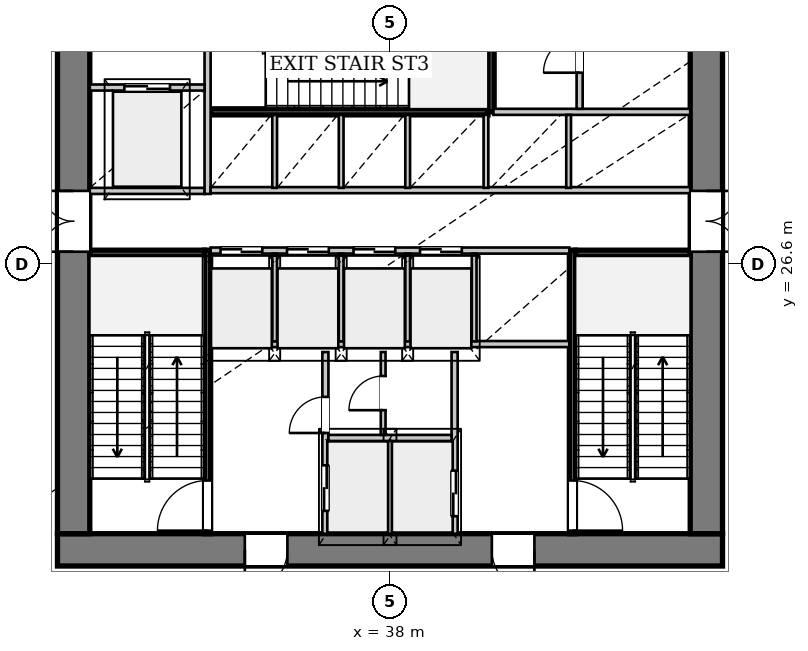
"""IFC4 building model, lengths in metres.
Left out: names, types, materials, properties, quantities, classifications, styles, units other than length and angle.
Written with IfcOpenShell. Run it as: python <this file> out.ifc"""

import sys

from ifc_helpers import new_model, si_unit, direction, frame, frame_2d, origin, place, context, subcontext, project, spatial, rectangle, extrude, source, transform, mapped, element, fill, save


model = new_model("IFC4")
c1 = context("Model", 3, precision=1e-05, world=origin(), true_north=direction((0.0, 1.0)))
c2 = subcontext(c1, "Body", "Model", "MODEL_VIEW")
j1 = project(units=[si_unit("LENGTHUNIT", "METRE"), si_unit("PLANEANGLEUNIT", "RADIAN")], contexts=[c1])
p1 = place(None, origin())
s1 = spatial("IfcSite", under=j1, at=p1, CompositionType="ELEMENT")
p2 = place(p1, origin())
s2 = spatial("IfcBuilding", under=s1, at=p2, CompositionType="ELEMENT")
p3 = place(p2, frame((0.0, 0.0, 5.4)))
s3 = spatial("IfcBuildingStorey", under=s2, at=p3, CompositionType="ELEMENT", Elevation=5.4)
p4 = place(p3, frame((46.75, 19.075, 0.0), z_axis=(0.0, 0.0, 1.0), x_axis=(-1.0, 0.0, 0.0)))
e1 = element("IfcWall", 1, at=p4, inside=s3, PredefinedType="SHEAR", context=c2, shape_type="SweptSolid", body=[
    extrude(rectangle(XDim=17.5, YDim=0.85, at=frame_2d((8.75, 0.0))), origin(), (0.0, 0.0, 1.0), 4.48),
])
p5 = place(p4, frame((4.95, 0.0, 0.0)))
e2 = element("IfcOpeningElement", 2, at=p5, cuts=e1, PredefinedType="OPENING", context=c2, shape_type="SweptSolid", body=[
    extrude(rectangle(XDim=1.12, YDim=2.25, at=frame_2d((0.56, 1.125))), frame((0.0, 0.435, 0.0), z_axis=(0.0, -1.0, 0.0), x_axis=(1.0, 0.0, 0.0)), (0.0, 0.0, 1.0), 0.87),
])
p6 = place(p4, frame((11.45, 0.0, 0.0)))
e3 = element("IfcOpeningElement", 3, at=p6, cuts=e1, PredefinedType="OPENING", context=c2, shape_type="SweptSolid", body=[
    extrude(rectangle(XDim=1.12, YDim=2.25, at=frame_2d((0.56, 1.125))), frame((0.0, 0.435, 0.0), z_axis=(0.0, -1.0, 0.0), x_axis=(1.0, 0.0, 0.0)), (0.0, 0.0, 1.0), 0.87),
])
p7 = place(p3, frame((29.675, 19.5, 0.0), z_axis=(0.0, 0.0, 1.0), x_axis=(0.0, 1.0, 0.0)))
e4 = element("IfcWall", 4, at=p7, inside=s3, PredefinedType="SHEAR", context=c2, shape_type="SweptSolid", body=[
    extrude(rectangle(XDim=14.2, YDim=0.85, at=frame_2d((7.1, 0.0))), origin(), (0.0, 0.0, 1.0), 4.48),
])
p8 = place(p7, frame((7.42, 0.0, 0.0)))
e5 = element("IfcOpeningElement", 5, at=p8, cuts=e4, PredefinedType="OPENING", context=c2, shape_type="SweptSolid", body=[
    extrude(rectangle(XDim=1.6, YDim=2.2, at=frame_2d((0.8, 1.1))), frame((0.0, 0.435, 0.0), z_axis=(0.0, -1.0, 0.0), x_axis=(1.0, 0.0, 0.0)), (0.0, 0.0, 1.0), 0.87),
])
p9 = place(p3, frame((46.325, 33.7, 0.0), z_axis=(0.0, 0.0, 1.0), x_axis=(0.0, -1.0, 0.0)))
e6 = element("IfcWall", 6, at=p9, inside=s3, PredefinedType="SHEAR", context=c2, shape_type="SweptSolid", body=[
    extrude(rectangle(XDim=14.2, YDim=0.85, at=frame_2d((7.1, 0.0))), origin(), (0.0, 0.0, 1.0), 4.48),
])
p10 = place(p9, frame((5.18, 0.0, 0.0)))
e7 = element("IfcOpeningElement", 7, at=p10, cuts=e6, PredefinedType="OPENING", context=c2, shape_type="SweptSolid", body=[
    extrude(rectangle(XDim=1.6, YDim=2.2, at=frame_2d((0.8, 1.1))), frame((0.0, 0.435, 0.0), z_axis=(0.0, -1.0, 0.0), x_axis=(1.0, 0.0, 0.0)), (0.0, 0.0, 1.0), 0.87),
])
p11 = place(p3, frame((33.2, 19.5, 0.0), z_axis=(0.0, 0.0, 1.0), x_axis=(0.0, 1.0, 0.0)))
e8 = element("IfcWall", 8, at=p11, inside=s3, PredefinedType="PARTITIONING", context=c2, shape_type="SweptSolid", body=[
    extrude(rectangle(XDim=7.46, YDim=0.16, at=frame_2d((3.73, 0.0))), origin(), (0.0, 0.0, 1.0), 4.48),
])
p12 = place(p11, frame((0.08, 0.0, 0.0)))
e9 = element("IfcOpeningElement", 9, at=p12, cuts=e8, PredefinedType="OPENING", context=c2, shape_type="SweptSolid", body=[
    extrude(rectangle(XDim=1.32, YDim=2.2, at=frame_2d((0.66, 1.1))), frame((0.0, 0.09, 0.0), z_axis=(0.0, -1.0, 0.0), x_axis=(1.0, 0.0, 0.0)), (0.0, 0.0, 1.0), 0.18),
])
p13 = place(p3, frame((30.1, 26.88, 0.0), z_axis=(0.0, 0.0, 1.0), x_axis=(1.0, 0.0, 0.0)))
e10 = element("IfcWall", 10, at=p13, inside=s3, PredefinedType="PARTITIONING", context=c2, shape_type="SweptSolid", body=[
    extrude(rectangle(XDim=3.02, YDim=0.16, at=frame_2d((1.51, 0.0))), origin(), (0.0, 0.0, 1.0), 4.48),
])
p14 = place(p3, frame((42.8, 26.96, 0.0), z_axis=(0.0, 0.0, 1.0), x_axis=(0.0, -1.0, 0.0)))
e11 = element("IfcWall", 11, at=p14, inside=s3, PredefinedType="PARTITIONING", context=c2, shape_type="SweptSolid", body=[
    extrude(rectangle(XDim=7.46, YDim=0.16, at=frame_2d((3.73, 0.0))), origin(), (0.0, 0.0, 1.0), 4.48),
])
p15 = place(p14, frame((6.06, 0.0, 0.0)))
e12 = element("IfcOpeningElement", 12, at=p15, cuts=e11, PredefinedType="OPENING", context=c2, shape_type="SweptSolid", body=[
    extrude(rectangle(XDim=1.32, YDim=2.2, at=frame_2d((0.66, 1.1))), frame((0.0, 0.09, 0.0), z_axis=(0.0, -1.0, 0.0), x_axis=(1.0, 0.0, 0.0)), (0.0, 0.0, 1.0), 0.18),
])
p16 = place(p3, frame((42.88, 26.88, 0.0), z_axis=(0.0, 0.0, 1.0), x_axis=(1.0, 0.0, 0.0)))
e13 = element("IfcWall", 13, at=p16, inside=s3, PredefinedType="PARTITIONING", context=c2, shape_type="SweptSolid", body=[
    extrude(rectangle(XDim=3.02, YDim=0.16, at=frame_2d((1.51, 0.0))), origin(), (0.0, 0.0, 1.0), 4.48),
])
p17 = place(p3, frame((33.28, 30.6, 0.0), z_axis=(0.0, 0.0, 1.0), x_axis=(1.0, 0.0, 0.0)))
e14 = element("IfcWall", 14, at=p17, inside=s3, PredefinedType="PARTITIONING", context=c2, shape_type="SweptSolid", body=[
    extrude(rectangle(XDim=7.3, YDim=0.16, at=frame_2d((3.65, 0.0))), origin(), (0.0, 0.0, 1.0), 4.48),
])
p18 = place(p3, frame((40.66, 30.6, 0.0), z_axis=(0.0, 0.0, 1.0), x_axis=(0.0, 1.0, 0.0)))
e15 = element("IfcWall", 15, at=p18, inside=s3, PredefinedType="PARTITIONING", context=c2, shape_type="SweptSolid", body=[
    extrude(rectangle(XDim=3.1, YDim=0.16, at=frame_2d((1.55, 0.0))), origin(), (0.0, 0.0, 1.0), 4.48),
])
p19 = place(p3, frame((36.3, 19.5, 0.0), z_axis=(0.0, 0.0, 1.0), x_axis=(0.0, 1.0, 0.0)))
e16 = element("IfcWall", 16, at=p19, inside=s3, PredefinedType="PARTITIONING", context=c2, shape_type="SweptSolid", body=[
    extrude(rectangle(XDim=4.78, YDim=0.16, at=frame_2d((2.39, 0.0))), origin(), (0.0, 0.0, 1.0), 4.48),
])
p20 = place(p19, frame((0.6, 0.0, 0.0)))
e17 = element("IfcOpeningElement", 17, at=p20, cuts=e16, PredefinedType="OPENING", context=c2, shape_type="SweptSolid", body=[
    extrude(rectangle(XDim=1.2, YDim=2.2, at=frame_2d((0.6, 1.1))), frame((0.0, 0.09, 0.0), z_axis=(0.0, -1.0, 0.0), x_axis=(1.0, 0.0, 0.0)), (0.0, 0.0, 1.0), 0.18),
])
p21 = place(p19, frame((2.65, 0.0, 0.0)))
e18 = element("IfcOpeningElement", 18, at=p21, cuts=e16, PredefinedType="OPENING", context=c2, shape_type="SweptSolid", body=[
    extrude(rectangle(XDim=0.95, YDim=2.1, at=frame_2d((0.475, 1.05))), frame((0.0, 0.09, 0.0), z_axis=(0.0, -1.0, 0.0), x_axis=(1.0, 0.0, 0.0)), (0.0, 0.0, 1.0), 0.18),
])
p22 = place(p3, frame((39.7, 24.28, 0.0), z_axis=(0.0, 0.0, 1.0), x_axis=(0.0, -1.0, 0.0)))
e19 = element("IfcWall", 19, at=p22, inside=s3, PredefinedType="PARTITIONING", context=c2, shape_type="SweptSolid", body=[
    extrude(rectangle(XDim=4.78, YDim=0.16, at=frame_2d((2.39, 0.0))), origin(), (0.0, 0.0, 1.0), 4.48),
])
p23 = place(p22, frame((3.12, 0.0, 0.0)))
e20 = element("IfcOpeningElement", 20, at=p23, cuts=e19, PredefinedType="OPENING", context=c2, shape_type="SweptSolid", body=[
    extrude(rectangle(XDim=1.2, YDim=2.2, at=frame_2d((0.6, 1.1))), frame((0.0, 0.09, 0.0), z_axis=(0.0, -1.0, 0.0), x_axis=(1.0, 0.0, 0.0)), (0.0, 0.0, 1.0), 0.18),
])
p24 = place(p3, frame((38.0, 19.5, 0.0), z_axis=(0.0, 0.0, 1.0), x_axis=(0.0, 1.0, 0.0)))
e21 = element("IfcWall", 21, at=p24, inside=s3, PredefinedType="PARTITIONING", context=c2, shape_type="SweptSolid", body=[
    extrude(rectangle(XDim=2.46, YDim=0.125, at=frame_2d((1.23, 0.0))), origin(), (0.0, 0.0, 1.0), 4.48),
])
p25 = place(p3, frame((36.38, 22.02, 0.0), z_axis=(0.0, 0.0, 1.0), x_axis=(1.0, 0.0, 0.0)))
e22 = element("IfcWall", 22, at=p25, inside=s3, PredefinedType="PARTITIONING", context=c2, shape_type="SweptSolid", body=[
    extrude(rectangle(XDim=3.24, YDim=0.16, at=frame_2d((1.62, 0.0))), origin(), (0.0, 0.0, 1.0), 4.48),
])
p26 = place(p3, frame((33.28, 24.49, 0.0), z_axis=(0.0, 0.0, 1.0), x_axis=(1.0, 0.0, 0.0)))
e23 = element("IfcWall", 23, at=p26, inside=s3, PredefinedType="PARTITIONING", context=c2, shape_type="SweptSolid", body=[
    extrude(rectangle(XDim=9.44, YDim=0.16, at=frame_2d((4.72, 0.0))), origin(), (0.0, 0.0, 1.0), 4.48),
])
p27 = place(p3, frame((37.82, 22.1, 0.0), z_axis=(0.0, 0.0, 1.0), x_axis=(0.0, 1.0, 0.0)))
e24 = element("IfcWall", 24, at=p27, inside=s3, PredefinedType="PARTITIONING", context=c2, shape_type="SweptSolid", body=[
    extrude(rectangle(XDim=2.18, YDim=0.125, at=frame_2d((1.09, 0.0))), origin(), (0.0, 0.0, 1.0), 4.48),
])
p28 = place(p27, frame((0.65, 0.0, 0.0)))
e25 = element("IfcOpeningElement", 25, at=p28, cuts=e24, PredefinedType="OPENING", context=c2, shape_type="SweptSolid", body=[
    extrude(rectangle(XDim=0.9, YDim=2.1, at=frame_2d((0.45, 1.05))), frame((0.0, 0.073, 0.0), z_axis=(0.0, -1.0, 0.0), x_axis=(1.0, 0.0, 0.0)), (0.0, 0.0, 1.0), 0.145),
])
p29 = place(p3, frame((30.1, 28.52, 0.0), z_axis=(0.0, 0.0, 1.0), x_axis=(1.0, 0.0, 0.0)))
e26 = element("IfcWall", 26, at=p29, inside=s3, PredefinedType="PARTITIONING", context=c2, shape_type="SweptSolid", body=[
    extrude(rectangle(XDim=3.02, YDim=0.16, at=frame_2d((1.51, 0.0))), origin(), (0.0, 0.0, 1.0), 4.48),
])
p30 = place(p3, frame((33.2, 28.44, 0.0), z_axis=(0.0, 0.0, 1.0), x_axis=(0.0, 1.0, 0.0)))
e27 = element("IfcWall", 27, at=p30, inside=s3, PredefinedType="PARTITIONING", context=c2, shape_type="SweptSolid", body=[
    extrude(rectangle(XDim=5.26, YDim=0.16, at=frame_2d((2.63, 0.0))), origin(), (0.0, 0.0, 1.0), 4.48),
])
p31 = place(p3, frame((30.1, 31.24, 0.0), z_axis=(0.0, 0.0, 1.0), x_axis=(1.0, 0.0, 0.0)))
e28 = element("IfcWall", 28, at=p31, inside=s3, PredefinedType="PARTITIONING", context=c2, shape_type="SweptSolid", body=[
    extrude(rectangle(XDim=3.02, YDim=0.16, at=frame_2d((1.51, 0.0))), origin(), (0.0, 0.0, 1.0), 4.48),
])
p32 = place(p31, frame((0.91, 0.0, 0.0)))
e29 = element("IfcOpeningElement", 29, at=p32, cuts=e28, PredefinedType="OPENING", context=c2, shape_type="SweptSolid", body=[
    extrude(rectangle(XDim=1.2, YDim=2.2, at=frame_2d((0.6, 1.1))), frame((0.0, 0.09, 0.0), z_axis=(0.0, -1.0, 0.0), x_axis=(1.0, 0.0, 0.0)), (0.0, 0.0, 1.0), 0.18),
])
p33 = place(p3, frame((33.28, 26.95, 0.0), z_axis=(0.0, 0.0, 1.0), x_axis=(1.0, 0.0, 0.0)))
e30 = element("IfcWall", 30, at=p33, inside=s3, PredefinedType="PARTITIONING", context=c2, shape_type="SweptSolid", body=[
    extrude(rectangle(XDim=9.44, YDim=0.16, at=frame_2d((4.72, 0.0))), origin(), (0.0, 0.0, 1.0), 4.48),
])
p34 = place(p33, frame((0.26, 0.0, 0.0)))
e31 = element("IfcOpeningElement", 31, at=p34, cuts=e30, PredefinedType="OPENING", context=c2, shape_type="SweptSolid", body=[
    extrude(rectangle(XDim=1.1, YDim=2.2, at=frame_2d((0.55, 1.1))), frame((0.0, 0.09, 0.0), z_axis=(0.0, -1.0, 0.0), x_axis=(1.0, 0.0, 0.0)), (0.0, 0.0, 1.0), 0.18),
])
p35 = place(p33, frame((2.01, 0.0, 0.0)))
e32 = element("IfcOpeningElement", 32, at=p35, cuts=e30, PredefinedType="OPENING", context=c2, shape_type="SweptSolid", body=[
    extrude(rectangle(XDim=1.1, YDim=2.2, at=frame_2d((0.55, 1.1))), frame((0.0, 0.09, 0.0), z_axis=(0.0, -1.0, 0.0), x_axis=(1.0, 0.0, 0.0)), (0.0, 0.0, 1.0), 0.18),
])
p36 = place(p33, frame((3.76, 0.0, 0.0)))
e33 = element("IfcOpeningElement", 33, at=p36, cuts=e30, PredefinedType="OPENING", context=c2, shape_type="SweptSolid", body=[
    extrude(rectangle(XDim=1.1, YDim=2.2, at=frame_2d((0.55, 1.1))), frame((0.0, 0.09, 0.0), z_axis=(0.0, -1.0, 0.0), x_axis=(1.0, 0.0, 0.0)), (0.0, 0.0, 1.0), 0.18),
])
p37 = place(p33, frame((5.51, 0.0, 0.0)))
e34 = element("IfcOpeningElement", 34, at=p37, cuts=e30, PredefinedType="OPENING", context=c2, shape_type="SweptSolid", body=[
    extrude(rectangle(XDim=1.1, YDim=2.2, at=frame_2d((0.55, 1.1))), frame((0.0, 0.09, 0.0), z_axis=(0.0, -1.0, 0.0), x_axis=(1.0, 0.0, 0.0)), (0.0, 0.0, 1.0), 0.18),
])
for number, where, z_axis, x_axis in (
    (35, (34.965, 24.56, 0.0), (0.0, 0.0, 1.0), (0.0, 1.0, 0.0)),
    (36, (36.715, 24.56, 0.0), (0.0, 0.0, 1.0), (0.0, 1.0, 0.0)),
    (37, (38.465, 24.56, 0.0), (0.0, 0.0, 1.0), (0.0, 1.0, 0.0)),
    (38, (40.215, 24.56, 0.0), (0.0, 0.0, 1.0), (0.0, 1.0, 0.0)),
):
    element("IfcWall", number, at=place(p3, frame(where, z_axis=z_axis, x_axis=x_axis)), inside=s3, PredefinedType="PARTITIONING", context=c2, shape_type="SweptSolid", body=[
        extrude(rectangle(XDim=2.31, YDim=0.125, at=frame_2d((1.155, 0.0))), origin(), (0.0, 0.0, 1.0), 4.48),
    ])
p38 = place(p3, frame((33.28, 28.54, 0.0), z_axis=(0.0, 0.0, 1.0), x_axis=(1.0, 0.0, 0.0)))
e39 = element("IfcWall", 39, at=p38, inside=s3, PredefinedType="PARTITIONING", context=c2, shape_type="SweptSolid", body=[
    extrude(rectangle(XDim=12.62, YDim=0.16, at=frame_2d((6.31, 0.0))), origin(), (0.0, 0.0, 1.0), 4.48),
])
p39 = place(p3, frame((40.72, 30.6, 0.0), z_axis=(0.0, 0.0, 1.0), x_axis=(1.0, 0.0, 0.0)))
e40 = element("IfcWall", 40, at=p39, inside=s3, PredefinedType="PARTITIONING", context=c2, shape_type="SweptSolid", body=[
    extrude(rectangle(XDim=5.18, YDim=0.16, at=frame_2d((2.59, 0.0))), origin(), (0.0, 0.0, 1.0), 4.48),
])
for number, where, z_axis, x_axis in (
    (41, (34.965, 28.6, 0.0), (0.0, 0.0, 1.0), (0.0, 1.0, 0.0)),
    (42, (36.715, 28.6, 0.0), (0.0, 0.0, 1.0), (0.0, 1.0, 0.0)),
    (43, (38.465, 28.6, 0.0), (0.0, 0.0, 1.0), (0.0, 1.0, 0.0)),
    (44, (40.525, 28.6, 0.0), (0.0, 0.0, 1.0), (0.0, 1.0, 0.0)),
    (45, (42.7, 28.6, 0.0), (0.0, 0.0, 1.0), (0.0, 1.0, 0.0)),
):
    element("IfcWall", number, at=place(p3, frame(where, z_axis=z_axis, x_axis=x_axis)), inside=s3, PredefinedType="PARTITIONING", context=c2, shape_type="SweptSolid", body=[
        extrude(rectangle(XDim=1.92, YDim=0.125, at=frame_2d((0.96, 0.0))), origin(), (0.0, 0.0, 1.0), 4.48),
    ])
p40 = place(p3, frame((42.99, 30.68, 0.0), z_axis=(0.0, 0.0, 1.0), x_axis=(0.0, 1.0, 0.0)))
e46 = element("IfcWall", 46, at=p40, inside=s3, PredefinedType="PARTITIONING", context=c2, shape_type="SweptSolid", body=[
    extrude(rectangle(XDim=3.02, YDim=0.16, at=frame_2d((1.51, 0.0))), origin(), (0.0, 0.0, 1.0), 4.48),
])
p41 = place(p40, frame((0.95, 0.0, 0.0)))
e47 = element("IfcOpeningElement", 47, at=p41, cuts=e46, PredefinedType="OPENING", context=c2, shape_type="SweptSolid", body=[
    extrude(rectangle(XDim=0.95, YDim=2.1, at=frame_2d((0.475, 1.05))), frame((0.0, 0.09, 0.0), z_axis=(0.0, -1.0, 0.0), x_axis=(1.0, 0.0, 0.0)), (0.0, 0.0, 1.0), 0.18),
])
m1 = source(origin(), c2, "Body", "SweptSolid", [
    extrude(rectangle(XDim=1.12, YDim=2.25, at=frame_2d((0.56, 1.125))), frame((0.0, 0.025, 0.0), z_axis=(0.0, -1.0, 0.0), x_axis=(1.0, 0.0, 0.0)), (0.0, 0.0, 1.0), 0.05),
])
p42 = place(p5, origin())
e48 = element("IfcDoor", 48, at=p42, inside=s3, OperationType="SINGLE_SWING_LEFT", PredefinedType="DOOR", context=c2, shape_type="MappedRepresentation", body=[
    mapped(m1, transform((0.0, 0.0, 0.0), x_axis=(1.0, 0.0, 0.0), y_axis=(0.0, 1.0, 0.0), z_axis=(0.0, 0.0, 1.0), scale=1.0)),
])
fill(e2, e48)
p43 = place(p6, origin())
e49 = element("IfcDoor", 49, at=p43, inside=s3, OperationType="SINGLE_SWING_RIGHT", PredefinedType="DOOR", context=c2, shape_type="MappedRepresentation", body=[
    mapped(m1, transform((0.0, 0.0, 0.0), x_axis=(1.0, 0.0, 0.0), y_axis=(0.0, 1.0, 0.0), z_axis=(0.0, 0.0, 1.0), scale=1.0)),
])
fill(e3, e49)
m2 = source(origin(), c2, "Body", "SweptSolid", [
    extrude(rectangle(XDim=1.6, YDim=2.2, at=frame_2d((0.8, 1.1))), frame((0.0, 0.025, 0.0), z_axis=(0.0, -1.0, 0.0), x_axis=(1.0, 0.0, 0.0)), (0.0, 0.0, 1.0), 0.05),
])
p44 = place(p8, origin())
e50 = element("IfcDoor", 50, at=p44, inside=s3, OperationType="DOUBLE_DOOR_SINGLE_SWING", PredefinedType="DOOR", context=c2, shape_type="MappedRepresentation", body=[
    mapped(m2, transform((0.0, 0.0, 0.0), x_axis=(1.0, 0.0, 0.0), y_axis=(0.0, 1.0, 0.0), z_axis=(0.0, 0.0, 1.0), scale=1.0)),
])
fill(e5, e50)
p45 = place(p10, origin())
e51 = element("IfcDoor", 51, at=p45, inside=s3, OperationType="DOUBLE_DOOR_SINGLE_SWING", PredefinedType="DOOR", context=c2, shape_type="MappedRepresentation", body=[
    mapped(m2, transform((0.0, 0.0, 0.0), x_axis=(1.0, 0.0, 0.0), y_axis=(0.0, 1.0, 0.0), z_axis=(0.0, 0.0, 1.0), scale=1.0)),
])
fill(e7, e51)
m3 = source(origin(), c2, "Body", "SweptSolid", [
    extrude(rectangle(XDim=1.32, YDim=2.2, at=frame_2d((0.66, 1.1))), frame((0.0, 0.025, 0.0), z_axis=(0.0, -1.0, 0.0), x_axis=(1.0, 0.0, 0.0)), (0.0, 0.0, 1.0), 0.05),
])
p46 = place(p12, origin())
e52 = element("IfcDoor", 52, at=p46, inside=s3, OperationType="SINGLE_SWING_LEFT", PredefinedType="DOOR", context=c2, shape_type="MappedRepresentation", body=[
    mapped(m3, transform((0.0, 0.0, 0.0), x_axis=(1.0, 0.0, 0.0), y_axis=(0.0, 1.0, 0.0), z_axis=(0.0, 0.0, 1.0), scale=1.0)),
])
fill(e9, e52)
p47 = place(p15, origin())
e53 = element("IfcDoor", 53, at=p47, inside=s3, OperationType="SINGLE_SWING_RIGHT", PredefinedType="DOOR", context=c2, shape_type="MappedRepresentation", body=[
    mapped(m3, transform((0.0, 0.0, 0.0), x_axis=(1.0, 0.0, 0.0), y_axis=(0.0, 1.0, 0.0), z_axis=(0.0, 0.0, 1.0), scale=1.0)),
])
fill(e12, e53)
m4 = source(origin(), c2, "Body", "SweptSolid", [
    extrude(rectangle(XDim=1.2, YDim=2.2, at=frame_2d((0.6, 1.1))), frame((0.0, 0.025, 0.0), z_axis=(0.0, -1.0, 0.0), x_axis=(1.0, 0.0, 0.0)), (0.0, 0.0, 1.0), 0.05),
])
p48 = place(p20, origin())
e54 = element("IfcDoor", 54, at=p48, inside=s3, OperationType="DOUBLE_DOOR_SLIDING", PredefinedType="DOOR", context=c2, shape_type="MappedRepresentation", body=[
    mapped(m4, transform((0.0, 0.0, 0.0), x_axis=(1.0, 0.0, 0.0), y_axis=(0.0, 1.0, 0.0), z_axis=(0.0, 0.0, 1.0), scale=1.0)),
])
fill(e17, e54)
m5 = source(origin(), c2, "Body", "SweptSolid", [
    extrude(rectangle(XDim=0.95, YDim=2.1, at=frame_2d((0.475, 1.05))), frame((0.0, 0.025, 0.0), z_axis=(0.0, -1.0, 0.0), x_axis=(1.0, 0.0, 0.0)), (0.0, 0.0, 1.0), 0.05),
])
p49 = place(p21, origin())
e55 = element("IfcDoor", 55, at=p49, inside=s3, OperationType="SINGLE_SWING_LEFT", PredefinedType="DOOR", context=c2, shape_type="MappedRepresentation", body=[
    mapped(m5, transform((0.0, 0.0, 0.0), x_axis=(1.0, 0.0, 0.0), y_axis=(0.0, 1.0, 0.0), z_axis=(0.0, 0.0, 1.0), scale=1.0)),
])
fill(e18, e55)
m6 = source(origin(), c2, "Body", "SweptSolid", [
    extrude(rectangle(XDim=0.9, YDim=2.1, at=frame_2d((0.45, 1.05))), frame((0.0, 0.025, 0.0), z_axis=(0.0, -1.0, 0.0), x_axis=(1.0, 0.0, 0.0)), (0.0, 0.0, 1.0), 0.05),
])
p50 = place(p28, origin())
e56 = element("IfcDoor", 56, at=p50, inside=s3, OperationType="SINGLE_SWING_LEFT", PredefinedType="DOOR", context=c2, shape_type="MappedRepresentation", body=[
    mapped(m6, transform((0.0, 0.0, 0.0), x_axis=(1.0, 0.0, 0.0), y_axis=(0.0, 1.0, 0.0), z_axis=(0.0, 0.0, 1.0), scale=1.0)),
])
fill(e25, e56)
p51 = place(p23, origin())
e57 = element("IfcDoor", 57, at=p51, inside=s3, OperationType="DOUBLE_DOOR_SLIDING", PredefinedType="DOOR", context=c2, shape_type="MappedRepresentation", body=[
    mapped(m4, transform((0.0, 0.0, 0.0), x_axis=(1.0, 0.0, 0.0), y_axis=(0.0, 1.0, 0.0), z_axis=(0.0, 0.0, 1.0), scale=1.0)),
])
fill(e20, e57)
p52 = place(p32, origin())
e58 = element("IfcDoor", 58, at=p52, inside=s3, OperationType="DOUBLE_DOOR_SLIDING", PredefinedType="DOOR", context=c2, shape_type="MappedRepresentation", body=[
    mapped(m4, transform((0.0, 0.0, 0.0), x_axis=(1.0, 0.0, 0.0), y_axis=(0.0, 1.0, 0.0), z_axis=(0.0, 0.0, 1.0), scale=1.0)),
])
fill(e29, e58)
m7 = source(origin(), c2, "Body", "SweptSolid", [
    extrude(rectangle(XDim=1.1, YDim=2.2, at=frame_2d((0.55, 1.1))), frame((0.0, 0.025, 0.0), z_axis=(0.0, -1.0, 0.0), x_axis=(1.0, 0.0, 0.0)), (0.0, 0.0, 1.0), 0.05),
])
p53 = place(p34, origin())
e59 = element("IfcDoor", 59, at=p53, inside=s3, OperationType="DOUBLE_DOOR_SLIDING", PredefinedType="DOOR", context=c2, shape_type="MappedRepresentation", body=[
    mapped(m7, transform((0.0, 0.0, 0.0), x_axis=(1.0, 0.0, 0.0), y_axis=(0.0, 1.0, 0.0), z_axis=(0.0, 0.0, 1.0), scale=1.0)),
])
fill(e31, e59)
p54 = place(p35, origin())
e60 = element("IfcDoor", 60, at=p54, inside=s3, OperationType="DOUBLE_DOOR_SLIDING", PredefinedType="DOOR", context=c2, shape_type="MappedRepresentation", body=[
    mapped(m7, transform((0.0, 0.0, 0.0), x_axis=(1.0, 0.0, 0.0), y_axis=(0.0, 1.0, 0.0), z_axis=(0.0, 0.0, 1.0), scale=1.0)),
])
fill(e32, e60)
p55 = place(p36, origin())
e61 = element("IfcDoor", 61, at=p55, inside=s3, OperationType="DOUBLE_DOOR_SLIDING", PredefinedType="DOOR", context=c2, shape_type="MappedRepresentation", body=[
    mapped(m7, transform((0.0, 0.0, 0.0), x_axis=(1.0, 0.0, 0.0), y_axis=(0.0, 1.0, 0.0), z_axis=(0.0, 0.0, 1.0), scale=1.0)),
])
fill(e33, e61)
p56 = place(p37, origin())
e62 = element("IfcDoor", 62, at=p56, inside=s3, OperationType="DOUBLE_DOOR_SLIDING", PredefinedType="DOOR", context=c2, shape_type="MappedRepresentation", body=[
    mapped(m7, transform((0.0, 0.0, 0.0), x_axis=(1.0, 0.0, 0.0), y_axis=(0.0, 1.0, 0.0), z_axis=(0.0, 0.0, 1.0), scale=1.0)),
])
fill(e34, e62)
p57 = place(p41, origin())
e63 = element("IfcDoor", 63, at=p57, inside=s3, OperationType="SINGLE_SWING_LEFT", PredefinedType="DOOR", context=c2, shape_type="MappedRepresentation", body=[
    mapped(m5, transform((0.0, 0.0, 0.0), x_axis=(1.0, 0.0, 0.0), y_axis=(0.0, 1.0, 0.0), z_axis=(0.0, 0.0, 1.0), scale=1.0)),
])
fill(e47, e63)
save(model, sys.argv[1])
